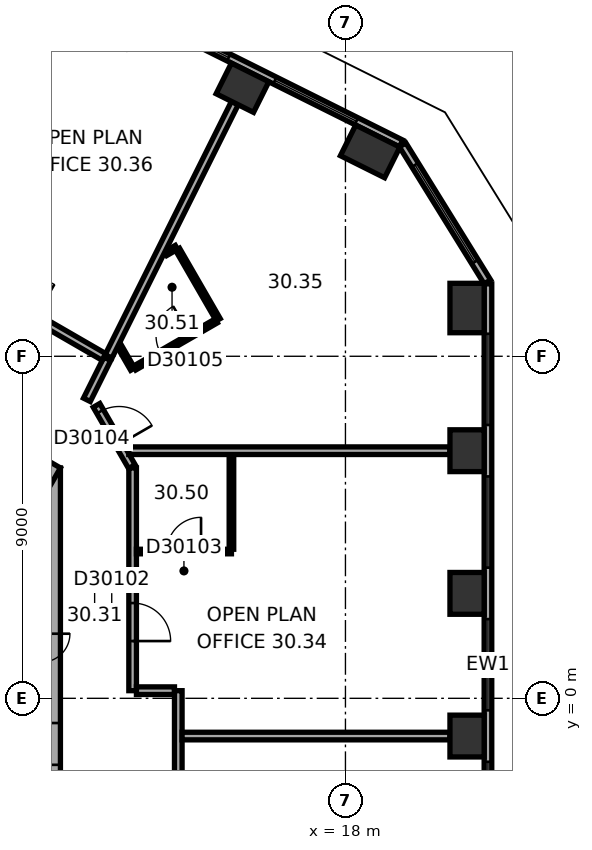
"""IFC4 building model, lengths in metres.
Left out: names, types, materials, properties, quantities, classifications, styles, units other than length and angle.
Written with IfcOpenShell. Run it as: python <this file> out.ifc"""

import sys

from ifc_helpers import new_model, si_unit, direction, frame, frame_2d, origin, origin_2d, place, context, subcontext, project, spatial, rectangle, extrude, element, fill, save


model = new_model("IFC4")
c1 = context("Model", 3, precision=1e-05, world=origin(), true_north=direction((0.0, 1.0)))
c2 = subcontext(c1, "Body", "Model", "MODEL_VIEW")
j1 = project(units=[si_unit("LENGTHUNIT", "METRE"), si_unit("PLANEANGLEUNIT", "RADIAN")], contexts=[c1])
p1 = place(None, origin())
s1 = spatial("IfcSite", under=j1, at=p1, CompositionType="ELEMENT")
p2 = place(p1, origin())
s2 = spatial("IfcBuilding", under=s1, at=p2, CompositionType="ELEMENT")
p3 = place(p2, frame((0.0, 0.0, 124.4)))
s3 = spatial("IfcBuildingStorey", under=s2, at=p3, CompositionType="ELEMENT", Elevation=124.4)
for number, where, z_axis, x_axis in (
    (1, (21.2, -0.993, 0.0), (0.0, 0.0, 1.0), (0.0, 1.0, 0.0)),
    (2, (21.2, 2.761, 0.0), (0.0, 0.0, 1.0), (0.0, 1.0, 0.0)),
    (3, (21.2, 6.515, 0.0), (0.0, 0.0, 1.0), (0.0, 1.0, 0.0)),
):
    element("IfcColumn", number, at=place(p3, frame(where, z_axis=z_axis, x_axis=x_axis)), inside=s3, PredefinedType="COLUMN", context=c2, shape_type="SweptSolid", body=[
        extrude(rectangle(XDim=1.1, YDim=0.9, at=origin_2d()), origin(), (0.0, 0.0, 1.0), 3.7),
    ])
for number, where, z_axis, x_axis in (
    (4, (21.2, 10.27, 0.0), (0.0, 0.0, 1.0), (0.0, 1.0, 0.0)),
    (5, (18.65, 14.39, 0.0), (0.0, 0.0, 1.0), (-0.895, 0.446, 0.0)),
):
    element("IfcColumn", number, at=place(p3, frame(where, z_axis=z_axis, x_axis=x_axis)), inside=s3, PredefinedType="COLUMN", context=c2, shape_type="SweptSolid", body=[
        extrude(rectangle(XDim=1.3, YDim=0.9, at=origin_2d()), origin(), (0.0, 0.0, 1.0), 3.7),
    ])
p4 = place(p3, frame((15.29, 16.065, 0.0), z_axis=(0.0, 0.0, 1.0), x_axis=(-0.894934361602, 0.44619781311, 0.0)))
e6 = element("IfcColumn", 6, at=p4, inside=s3, PredefinedType="COLUMN", context=c2, shape_type="SweptSolid", body=[
    extrude(rectangle(XDim=1.1, YDim=0.9, at=origin_2d()), origin(), (0.0, 0.0, 1.0), 3.7),
])
p5 = place(p3, frame((10.0, -6.062, 0.0), z_axis=(0.0, 0.0, 1.0), x_axis=(0.0, 1.0, 0.0)))
e7 = element("IfcWall", 7, at=p5, inside=s3, PredefinedType="SHEAR", context=c2, shape_type="SweptSolid", body=[
    extrude(rectangle(XDim=12.125, YDim=1.0, at=frame_2d((6.062, 0.0))), origin(), (0.0, 0.0, 1.0), 3.7),
])
p6 = place(p5, frame((6.262, 0.0, 0.0)))
e8 = element("IfcOpeningElement", 8, at=p6, cuts=e7, PredefinedType="OPENING", context=c2, shape_type="SweptSolid", body=[
    extrude(rectangle(XDim=1.5, YDim=2.1, at=frame_2d((0.75, 1.05))), frame((0.0, 0.51, 0.0), z_axis=(0.0, -1.0, 0.0), x_axis=(1.0, 0.0, 0.0)), (0.0, 0.0, 1.0), 1.02),
])
p7 = place(p5, frame((1.712, 0.0, 0.0)))
e9 = element("IfcOpeningElement", 9, at=p7, cuts=e7, PredefinedType="OPENING", context=c2, shape_type="SweptSolid", body=[
    extrude(rectangle(XDim=1.1, YDim=2.1, at=frame_2d((0.55, 1.05))), frame((0.0, 0.51, 0.0), z_axis=(0.0, -1.0, 0.0), x_axis=(1.0, 0.0, 0.0)), (0.0, 0.0, 1.0), 1.02),
])
p8 = place(p5, frame((4.312, 0.0, 0.0)))
e10 = element("IfcOpeningElement", 10, at=p8, cuts=e7, PredefinedType="OPENING", context=c2, shape_type="SweptSolid", body=[
    extrude(rectangle(XDim=1.1, YDim=2.1, at=frame_2d((0.55, 1.05))), frame((0.0, 0.51, 0.0), z_axis=(0.0, -1.0, 0.0), x_axis=(1.0, 0.0, 0.0)), (0.0, 0.0, 1.0), 1.02),
])
p9 = place(p3, frame((10.25, 5.629, 0.0), z_axis=(0.0, 0.0, 1.0), x_axis=(-0.866022616891, 0.50000482701, 0.0)))
e11 = element("IfcWall", 11, at=p9, inside=s3, PredefinedType="SHEAR", context=c2, shape_type="SweptSolid", body=[
    extrude(rectangle(XDim=12.125, YDim=1.0, at=frame_2d((6.062, 0.0))), origin(), (0.0, 0.0, 1.0), 3.7),
])
p10 = place(p9, frame((2.612, 0.0, 0.0)))
e12 = element("IfcOpeningElement", 12, at=p10, cuts=e11, PredefinedType="OPENING", context=c2, shape_type="SweptSolid", body=[
    extrude(rectangle(XDim=1.1, YDim=2.1, at=frame_2d((0.55, 1.05))), frame((0.0, 0.51, 0.0), z_axis=(0.0, -1.0, 0.0), x_axis=(1.0, 0.0, 0.0)), (0.0, 0.0, 1.0), 1.02),
])
p11 = place(p9, frame((5.212, 0.0, 0.0)))
e13 = element("IfcOpeningElement", 13, at=p11, cuts=e11, PredefinedType="OPENING", context=c2, shape_type="SweptSolid", body=[
    extrude(rectangle(XDim=1.1, YDim=2.1, at=frame_2d((0.55, 1.05))), frame((0.0, 0.51, 0.0), z_axis=(0.0, -1.0, 0.0), x_axis=(1.0, 0.0, 0.0)), (0.0, 0.0, 1.0), 1.02),
])
p12 = place(p9, frame((7.812, 0.0, 0.0)))
e14 = element("IfcOpeningElement", 14, at=p12, cuts=e11, PredefinedType="OPENING", context=c2, shape_type="SweptSolid", body=[
    extrude(rectangle(XDim=1.1, YDim=2.1, at=frame_2d((0.55, 1.05))), frame((0.0, 0.51, 0.0), z_axis=(0.0, -1.0, 0.0), x_axis=(1.0, 0.0, 0.0)), (0.0, 0.0, 1.0), 1.02),
])
p13 = place(p3, frame((21.75, -9.138, 0.0), z_axis=(0.0, 0.0, 1.0), x_axis=(0.0, 1.0, 0.0)))
e15 = element("IfcWall", 15, at=p13, inside=s3, PredefinedType="STANDARD", context=c2, shape_type="SweptSolid", body=[
    extrude(rectangle(XDim=20.044, YDim=0.2, at=frame_2d((10.022, 0.0))), origin(), (0.0, 0.0, 1.0), 3.7),
])
p14 = place(p13, frame((1.314, 0.0, 0.9)))
e16 = element("IfcOpeningElement", 16, at=p14, cuts=e15, PredefinedType="OPENING", context=c2, shape_type="SweptSolid", body=[
    extrude(rectangle(XDim=2.4, YDim=2.0, at=frame_2d((1.2, 1.0))), frame((0.0, 0.11, 0.0), z_axis=(0.0, -1.0, 0.0), x_axis=(1.0, 0.0, 0.0)), (0.0, 0.0, 1.0), 0.22),
])
p15 = place(p13, frame((5.069, 0.0, 0.9)))
e17 = element("IfcOpeningElement", 17, at=p15, cuts=e15, PredefinedType="OPENING", context=c2, shape_type="SweptSolid", body=[
    extrude(rectangle(XDim=2.4, YDim=2.0, at=frame_2d((1.2, 1.0))), frame((0.0, 0.11, 0.0), z_axis=(0.0, -1.0, 0.0), x_axis=(1.0, 0.0, 0.0)), (0.0, 0.0, 1.0), 0.22),
])
p16 = place(p13, frame((8.823, 0.0, 0.9)))
e18 = element("IfcOpeningElement", 18, at=p16, cuts=e15, PredefinedType="OPENING", context=c2, shape_type="SweptSolid", body=[
    extrude(rectangle(XDim=2.4, YDim=2.0, at=frame_2d((1.2, 1.0))), frame((0.0, 0.11, 0.0), z_axis=(0.0, -1.0, 0.0), x_axis=(1.0, 0.0, 0.0)), (0.0, 0.0, 1.0), 0.22),
])
p17 = place(p13, frame((12.577, 0.0, 0.9)))
e19 = element("IfcOpeningElement", 19, at=p17, cuts=e15, PredefinedType="OPENING", context=c2, shape_type="SweptSolid", body=[
    extrude(rectangle(XDim=2.4, YDim=2.0, at=frame_2d((1.2, 1.0))), frame((0.0, 0.11, 0.0), z_axis=(0.0, -1.0, 0.0), x_axis=(1.0, 0.0, 0.0)), (0.0, 0.0, 1.0), 0.22),
])
p18 = place(p13, frame((16.331, 0.0, 0.9)))
e20 = element("IfcOpeningElement", 20, at=p18, cuts=e15, PredefinedType="OPENING", context=c2, shape_type="SweptSolid", body=[
    extrude(rectangle(XDim=2.4, YDim=2.0, at=frame_2d((1.2, 1.0))), frame((0.0, 0.11, 0.0), z_axis=(0.0, -1.0, 0.0), x_axis=(1.0, 0.0, 0.0)), (0.0, 0.0, 1.0), 0.22),
])
p19 = place(p3, frame((21.735, 10.958, 0.0), z_axis=(0.0, 0.0, 1.0), x_axis=(-0.526213807775, 0.850352296702, 0.0)))
e21 = element("IfcWall", 21, at=p19, inside=s3, PredefinedType="STANDARD", context=c2, shape_type="SweptSolid", body=[
    extrude(rectangle(XDim=4.238, YDim=0.2, at=frame_2d((2.119, 0.0))), origin(), (0.0, 0.0, 1.0), 3.7),
])
p20 = place(p19, frame((0.619, 0.0, 0.9)))
e22 = element("IfcOpeningElement", 22, at=p20, cuts=e21, PredefinedType="OPENING", context=c2, shape_type="SweptSolid", body=[
    extrude(rectangle(XDim=3.0, YDim=2.0, at=frame_2d((1.5, 1.0))), frame((0.0, 0.11, 0.0), z_axis=(0.0, -1.0, 0.0), x_axis=(1.0, 0.0, 0.0)), (0.0, 0.0, 1.0), 0.22),
])
p21 = place(p3, frame((19.464, 14.599, 0.0), z_axis=(0.0, 0.0, 1.0), x_axis=(-0.894935755043, 0.446195018289, 0.0)))
e23 = element("IfcWall", 23, at=p21, inside=s3, PredefinedType="STANDARD", context=c2, shape_type="SweptSolid", body=[
    extrude(rectangle(XDim=20.044, YDim=0.2, at=frame_2d((10.022, 0.0))), origin(), (0.0, 0.0, 1.0), 3.7),
])
p22 = place(p21, frame((1.313, 0.0, 0.9)))
e24 = element("IfcOpeningElement", 24, at=p22, cuts=e23, PredefinedType="OPENING", context=c2, shape_type="SweptSolid", body=[
    extrude(rectangle(XDim=2.4, YDim=2.0, at=frame_2d((1.2, 1.0))), frame((0.0, 0.11, 0.0), z_axis=(0.0, -1.0, 0.0), x_axis=(1.0, 0.0, 0.0)), (0.0, 0.0, 1.0), 0.22),
])
p23 = place(p21, frame((5.067, 0.0, 0.9)))
e25 = element("IfcOpeningElement", 25, at=p23, cuts=e23, PredefinedType="OPENING", context=c2, shape_type="SweptSolid", body=[
    extrude(rectangle(XDim=2.4, YDim=2.0, at=frame_2d((1.2, 1.0))), frame((0.0, 0.11, 0.0), z_axis=(0.0, -1.0, 0.0), x_axis=(1.0, 0.0, 0.0)), (0.0, 0.0, 1.0), 0.22),
])
p24 = place(p21, frame((8.821, 0.0, 0.9)))
e26 = element("IfcOpeningElement", 26, at=p24, cuts=e23, PredefinedType="OPENING", context=c2, shape_type="SweptSolid", body=[
    extrude(rectangle(XDim=2.4, YDim=2.0, at=frame_2d((1.2, 1.0))), frame((0.0, 0.11, 0.0), z_axis=(0.0, -1.0, 0.0), x_axis=(1.0, 0.0, 0.0)), (0.0, 0.0, 1.0), 0.22),
])
p25 = place(p21, frame((12.575, 0.0, 0.9)))
e27 = element("IfcOpeningElement", 27, at=p25, cuts=e23, PredefinedType="OPENING", context=c2, shape_type="SweptSolid", body=[
    extrude(rectangle(XDim=2.4, YDim=2.0, at=frame_2d((1.2, 1.0))), frame((0.0, 0.11, 0.0), z_axis=(0.0, -1.0, 0.0), x_axis=(1.0, 0.0, 0.0)), (0.0, 0.0, 1.0), 0.22),
])
p26 = place(p21, frame((16.329, 0.0, 0.9)))
e28 = element("IfcOpeningElement", 28, at=p26, cuts=e23, PredefinedType="OPENING", context=c2, shape_type="SweptSolid", body=[
    extrude(rectangle(XDim=2.4, YDim=2.0, at=frame_2d((1.2, 1.0))), frame((0.0, 0.11, 0.0), z_axis=(0.0, -1.0, 0.0), x_axis=(1.0, 0.0, 0.0)), (0.0, 0.0, 1.0), 0.22),
])
p27 = place(p3, frame((11.196, 7.854, 0.0), z_axis=(0.0, 0.0, 1.0), x_axis=(0.446241040303, 0.894912808015, 0.0)))
e29 = element("IfcWall", 29, at=p27, inside=s3, PredefinedType="PARTITIONING", context=c2, shape_type="SweptSolid", body=[
    extrude(rectangle(XDim=1.205, YDim=0.2, at=frame_2d((0.603, 0.0))), origin(), (0.0, 0.0, 1.0), 3.42),
])
p28 = place(p3, frame((11.646, 8.981, 0.0), z_axis=(0.0, 0.0, 1.0), x_axis=(-0.866027142779, 0.499996987961, 0.0)))
e30 = element("IfcWall", 30, at=p28, inside=s3, PredefinedType="PARTITIONING", context=c2, shape_type="SweptSolid", body=[
    extrude(rectangle(XDim=9.597, YDim=0.2, at=frame_2d((4.798, 0.0))), origin(), (0.0, 0.0, 1.0), 3.42),
])
p29 = place(p28, frame((2.086, 0.0, 0.0)))
e31 = element("IfcOpeningElement", 31, at=p29, cuts=e30, PredefinedType="OPENING", context=c2, shape_type="SweptSolid", body=[
    extrude(rectangle(XDim=1.0, YDim=2.1, at=frame_2d((0.5, 1.05))), frame((0.0, 0.11, 0.0), z_axis=(0.0, -1.0, 0.0), x_axis=(1.0, 0.0, 0.0)), (0.0, 0.0, 1.0), 0.22),
])
p30 = place(p28, frame((8.01, 0.0, 0.0)))
e32 = element("IfcOpeningElement", 32, at=p30, cuts=e30, PredefinedType="OPENING", context=c2, shape_type="SweptSolid", body=[
    extrude(rectangle(XDim=1.0, YDim=2.1, at=frame_2d((0.5, 1.05))), frame((0.0, 0.11, 0.0), z_axis=(0.0, -1.0, 0.0), x_axis=(1.0, 0.0, 0.0)), (0.0, 0.0, 1.0), 0.22),
])
p31 = place(p3, frame((12.38, 6.097, 0.0), z_axis=(0.0, 0.0, 1.0), x_axis=(-0.499964847546, 0.866045698112, 0.0)))
e33 = element("IfcWall", 33, at=p31, inside=s3, PredefinedType="PARTITIONING", context=c2, shape_type="SweptSolid", body=[
    extrude(rectangle(XDim=1.86, YDim=0.2, at=frame_2d((0.93, 0.0))), origin(), (0.0, 0.0, 1.0), 3.42),
])
p32 = place(p31, frame((0.672, 0.0, 0.0)))
e34 = element("IfcOpeningElement", 34, at=p32, cuts=e33, PredefinedType="OPENING", context=c2, shape_type="SweptSolid", body=[
    extrude(rectangle(XDim=1.0, YDim=2.1, at=frame_2d((0.5, 1.05))), frame((0.0, 0.11, 0.0), z_axis=(0.0, -1.0, 0.0), x_axis=(1.0, 0.0, 0.0)), (0.0, 0.0, 1.0), 0.22),
])
p33 = place(p3, frame((12.4, 0.201, 0.0), z_axis=(0.0, 0.0, 1.0), x_axis=(0.0, 1.0, 0.0)))
e35 = element("IfcWall", 35, at=p33, inside=s3, PredefinedType="PARTITIONING", context=c2, shape_type="SweptSolid", body=[
    extrude(rectangle(XDim=5.861, YDim=0.2, at=frame_2d((2.931, 0.0))), origin(), (0.0, 0.0, 1.0), 3.42),
])
p34 = place(p33, frame((1.306, 0.0, 0.0)))
e36 = element("IfcOpeningElement", 36, at=p34, cuts=e35, PredefinedType="OPENING", context=c2, shape_type="SweptSolid", body=[
    extrude(rectangle(XDim=1.0, YDim=2.1, at=frame_2d((0.5, 1.05))), frame((0.0, 0.11, 0.0), z_axis=(0.0, -1.0, 0.0), x_axis=(1.0, 0.0, 0.0)), (0.0, 0.0, 1.0), 0.22),
])
p35 = place(p3, frame((12.401, 8.661, 0.0), z_axis=(0.0, 0.0, 1.0), x_axis=(-0.499831418649, 0.866122712398, 0.0)))
e37 = element("IfcWall", 37, at=p35, inside=s3, PredefinedType="PARTITIONING", context=c2, shape_type="SweptSolid", body=[
    extrude(rectangle(XDim=0.711, YDim=0.12, at=frame_2d((0.355, 0.0))), origin(), (0.0, 0.0, 1.0), 3.42),
])
p36 = place(p3, frame((13.269, 11.702, 0.0), z_axis=(0.0, 0.0, 1.0), x_axis=(0.865936922628, 0.500153222552, 0.0)))
e38 = element("IfcWall", 38, at=p36, inside=s3, PredefinedType="PARTITIONING", context=c2, shape_type="SweptSolid", body=[
    extrude(rectangle(XDim=0.327, YDim=0.12, at=frame_2d((0.164, 0.0))), origin(), (0.0, 0.0, 1.0), 3.42),
])
p37 = place(p3, frame((13.501, 0.201, 0.0), z_axis=(0.0, 0.0, 1.0), x_axis=(-1.0, 0.0, 0.0)))
e39 = element("IfcWall", 39, at=p37, inside=s3, PredefinedType="PARTITIONING", context=c2, shape_type="SweptSolid", body=[
    extrude(rectangle(XDim=1.001, YDim=0.2, at=frame_2d((0.5, 0.0))), origin(), (0.0, 0.0, 1.0), 3.42),
])
p38 = place(p3, frame((13.583, 11.814, 0.0), z_axis=(0.0, 0.0, 1.0), x_axis=(0.500028586798, -0.86600889856, 0.0)))
e40 = element("IfcWall", 40, at=p38, inside=s3, PredefinedType="PARTITIONING", context=c2, shape_type="SweptSolid", body=[
    extrude(rectangle(XDim=2.14, YDim=0.12, at=frame_2d((1.07, 0.0))), origin(), (0.0, 0.0, 1.0), 3.42),
])
p39 = place(p3, frame((13.601, -5.501, 0.0), z_axis=(0.0, 0.0, 1.0), x_axis=(0.0, 1.0, 0.0)))
e41 = element("IfcWall", 41, at=p39, inside=s3, PredefinedType="PARTITIONING", context=c2, shape_type="SweptSolid", body=[
    extrude(rectangle(XDim=5.702, YDim=0.2, at=frame_2d((2.851, 0.0))), origin(), (0.0, 0.0, 1.0), 3.42),
])
p40 = place(p39, frame((2.131, 0.0, 0.0)))
e42 = element("IfcOpeningElement", 42, at=p40, cuts=e41, PredefinedType="OPENING", context=c2, shape_type="SweptSolid", body=[
    extrude(rectangle(XDim=1.0, YDim=2.1, at=frame_2d((0.5, 1.05))), frame((0.0, 0.11, 0.0), z_axis=(0.0, -1.0, 0.0), x_axis=(1.0, 0.0, 0.0)), (0.0, 0.0, 1.0), 0.22),
])
p41 = place(p3, frame((14.601, 9.931, 0.0), z_axis=(0.0, 0.0, 1.0), x_axis=(-0.866023285932, -0.50000366821, 0.0)))
e43 = element("IfcWall", 43, at=p41, inside=s3, PredefinedType="PARTITIONING", context=c2, shape_type="SweptSolid", body=[
    extrude(rectangle(XDim=2.48, YDim=0.12, at=frame_2d((1.24, 0.0))), origin(), (0.0, 0.0, 1.0), 3.42),
])
p42 = place(p41, frame((0.79, 0.0, 0.0)))
e44 = element("IfcOpeningElement", 44, at=p42, cuts=e43, PredefinedType="OPENING", context=c2, shape_type="SweptSolid", body=[
    extrude(rectangle(XDim=0.9, YDim=2.1, at=frame_2d((0.45, 1.05))), frame((0.0, 0.07, 0.0), z_axis=(0.0, -1.0, 0.0), x_axis=(1.0, 0.0, 0.0)), (0.0, 0.0, 1.0), 0.14),
])
p43 = place(p3, frame((15.0, 3.862, 0.0), z_axis=(0.0, 0.0, 1.0), x_axis=(-1.0, 0.0, 0.0)))
e45 = element("IfcWall", 45, at=p43, inside=s3, PredefinedType="PARTITIONING", context=c2, shape_type="SweptSolid", body=[
    extrude(rectangle(XDim=2.5, YDim=0.12, at=frame_2d((1.25, 0.0))), origin(), (0.0, 0.0, 1.0), 3.42),
])
p44 = place(p43, frame((0.8, 0.0, 0.0)))
e46 = element("IfcOpeningElement", 46, at=p44, cuts=e45, PredefinedType="OPENING", context=c2, shape_type="SweptSolid", body=[
    extrude(rectangle(XDim=0.9, YDim=2.1, at=frame_2d((0.45, 1.05))), frame((0.0, 0.07, 0.0), z_axis=(0.0, -1.0, 0.0), x_axis=(1.0, 0.0, 0.0)), (0.0, 0.0, 1.0), 0.14),
])
p45 = place(p3, frame((15.0, 6.415, 0.0), z_axis=(0.0, 0.0, 1.0), x_axis=(0.0, -1.0, 0.0)))
e47 = element("IfcWall", 47, at=p45, inside=s3, PredefinedType="PARTITIONING", context=c2, shape_type="SweptSolid", body=[
    extrude(rectangle(XDim=2.493, YDim=0.12, at=frame_2d((1.247, 0.0))), origin(), (0.0, 0.0, 1.0), 3.42),
])
p46 = place(p3, frame((15.09, 15.663, 0.0), z_axis=(0.0, 0.0, 1.0), x_axis=(-0.446203977428, -0.89493128816, 0.0)))
e48 = element("IfcWall", 48, at=p46, inside=s3, PredefinedType="PARTITIONING", context=c2, shape_type="SweptSolid", body=[
    extrude(rectangle(XDim=7.45, YDim=0.2, at=frame_2d((3.725, 0.0))), origin(), (0.0, 0.0, 1.0), 3.42),
])
p47 = place(p3, frame((20.75, -0.993, 0.0), z_axis=(0.0, 0.0, 1.0), x_axis=(-1.0, 0.0, 0.0)))
e49 = element("IfcWall", 49, at=p47, inside=s3, PredefinedType="PARTITIONING", context=c2, shape_type="SweptSolid", body=[
    extrude(rectangle(XDim=7.049, YDim=0.2, at=frame_2d((3.524, 0.0))), origin(), (0.0, 0.0, 1.0), 2.87),
])
p48 = place(p3, frame((20.75, 6.515, 0.0), z_axis=(0.0, 0.0, 1.0), x_axis=(-1.0, 0.0, 0.0)))
e50 = element("IfcWall", 50, at=p48, inside=s3, PredefinedType="PARTITIONING", context=c2, shape_type="SweptSolid", body=[
    extrude(rectangle(XDim=8.452, YDim=0.2, at=frame_2d((4.226, 0.0))), origin(), (0.0, 0.0, 1.0), 3.42),
])
p49 = place(p15, origin())
e51 = element("IfcWindow", 51, at=p49, inside=s3, PartitioningType="SINGLE_PANEL", PredefinedType="WINDOW", context=c2, shape_type="SweptSolid", body=[
    extrude(rectangle(XDim=2.4, YDim=2.0, at=frame_2d((1.2, 1.0))), frame((0.0, 0.03, 0.0), z_axis=(0.0, -1.0, 0.0), x_axis=(1.0, 0.0, 0.0)), (0.0, 0.0, 1.0), 0.06),
])
fill(e17, e51)
p50 = place(p16, origin())
e52 = element("IfcWindow", 52, at=p50, inside=s3, PartitioningType="SINGLE_PANEL", PredefinedType="WINDOW", context=c2, shape_type="SweptSolid", body=[
    extrude(rectangle(XDim=2.4, YDim=2.0, at=frame_2d((1.2, 1.0))), frame((0.0, 0.03, 0.0), z_axis=(0.0, -1.0, 0.0), x_axis=(1.0, 0.0, 0.0)), (0.0, 0.0, 1.0), 0.06),
])
fill(e18, e52)
p51 = place(p17, origin())
e53 = element("IfcWindow", 53, at=p51, inside=s3, PartitioningType="SINGLE_PANEL", PredefinedType="WINDOW", context=c2, shape_type="SweptSolid", body=[
    extrude(rectangle(XDim=2.4, YDim=2.0, at=frame_2d((1.2, 1.0))), frame((0.0, 0.03, 0.0), z_axis=(0.0, -1.0, 0.0), x_axis=(1.0, 0.0, 0.0)), (0.0, 0.0, 1.0), 0.06),
])
fill(e19, e53)
p52 = place(p18, origin())
e54 = element("IfcWindow", 54, at=p52, inside=s3, PartitioningType="SINGLE_PANEL", PredefinedType="WINDOW", context=c2, shape_type="SweptSolid", body=[
    extrude(rectangle(XDim=2.4, YDim=2.0, at=frame_2d((1.2, 1.0))), frame((0.0, 0.03, 0.0), z_axis=(0.0, -1.0, 0.0), x_axis=(1.0, 0.0, 0.0)), (0.0, 0.0, 1.0), 0.06),
])
fill(e20, e54)
p53 = place(p20, origin())
e55 = element("IfcWindow", 55, at=p53, inside=s3, PartitioningType="SINGLE_PANEL", PredefinedType="WINDOW", context=c2, shape_type="SweptSolid", body=[
    extrude(rectangle(XDim=3.0, YDim=2.0, at=frame_2d((1.5, 1.0))), frame((0.0, 0.03, 0.0), z_axis=(0.0, -1.0, 0.0), x_axis=(1.0, 0.0, 0.0)), (0.0, 0.0, 1.0), 0.06),
])
fill(e22, e55)
p54 = place(p22, origin())
e56 = element("IfcWindow", 56, at=p54, inside=s3, PartitioningType="SINGLE_PANEL", PredefinedType="WINDOW", context=c2, shape_type="SweptSolid", body=[
    extrude(rectangle(XDim=2.4, YDim=2.0, at=frame_2d((1.2, 1.0))), frame((0.0, 0.03, 0.0), z_axis=(0.0, -1.0, 0.0), x_axis=(1.0, 0.0, 0.0)), (0.0, 0.0, 1.0), 0.06),
])
fill(e24, e56)
p55 = place(p23, origin())
e57 = element("IfcWindow", 57, at=p55, inside=s3, PartitioningType="SINGLE_PANEL", PredefinedType="WINDOW", context=c2, shape_type="SweptSolid", body=[
    extrude(rectangle(XDim=2.4, YDim=2.0, at=frame_2d((1.2, 1.0))), frame((0.0, 0.03, 0.0), z_axis=(0.0, -1.0, 0.0), x_axis=(1.0, 0.0, 0.0)), (0.0, 0.0, 1.0), 0.06),
])
fill(e25, e57)
p56 = place(p34, origin())
e58 = element("IfcDoor", 58, at=p56, inside=s3, OperationType="SINGLE_SWING_LEFT", PredefinedType="DOOR", context=c2, shape_type="SweptSolid", body=[
    extrude(rectangle(XDim=1.0, YDim=2.1, at=frame_2d((0.5, 1.05))), frame((0.0, 0.025, 0.0), z_axis=(0.0, -1.0, 0.0), x_axis=(1.0, 0.0, 0.0)), (0.0, 0.0, 1.0), 0.05),
])
fill(e36, e58)
p57 = place(p44, origin())
e59 = element("IfcDoor", 59, at=p57, inside=s3, OperationType="SINGLE_SWING_LEFT", PredefinedType="DOOR", context=c2, shape_type="SweptSolid", body=[
    extrude(rectangle(XDim=0.9, YDim=2.1, at=frame_2d((0.45, 1.05))), frame((0.0, 0.025, 0.0), z_axis=(0.0, -1.0, 0.0), x_axis=(1.0, 0.0, 0.0)), (0.0, 0.0, 1.0), 0.05),
])
fill(e46, e59)
p58 = place(p32, origin())
e60 = element("IfcDoor", 60, at=p58, inside=s3, OperationType="SINGLE_SWING_LEFT", PredefinedType="DOOR", context=c2, shape_type="SweptSolid", body=[
    extrude(rectangle(XDim=1.0, YDim=2.1, at=frame_2d((0.5, 1.05))), frame((0.0, 0.025, 0.0), z_axis=(0.0, -1.0, 0.0), x_axis=(1.0, 0.0, 0.0)), (0.0, 0.0, 1.0), 0.05),
])
fill(e34, e60)
p59 = place(p42, origin())
e61 = element("IfcDoor", 61, at=p59, inside=s3, OperationType="SINGLE_SWING_LEFT", PredefinedType="DOOR", context=c2, shape_type="SweptSolid", body=[
    extrude(rectangle(XDim=0.9, YDim=2.1, at=frame_2d((0.45, 1.05))), frame((0.0, 0.025, 0.0), z_axis=(0.0, -1.0, 0.0), x_axis=(1.0, 0.0, 0.0)), (0.0, 0.0, 1.0), 0.05),
])
fill(e44, e61)
save(model, sys.argv[1])
